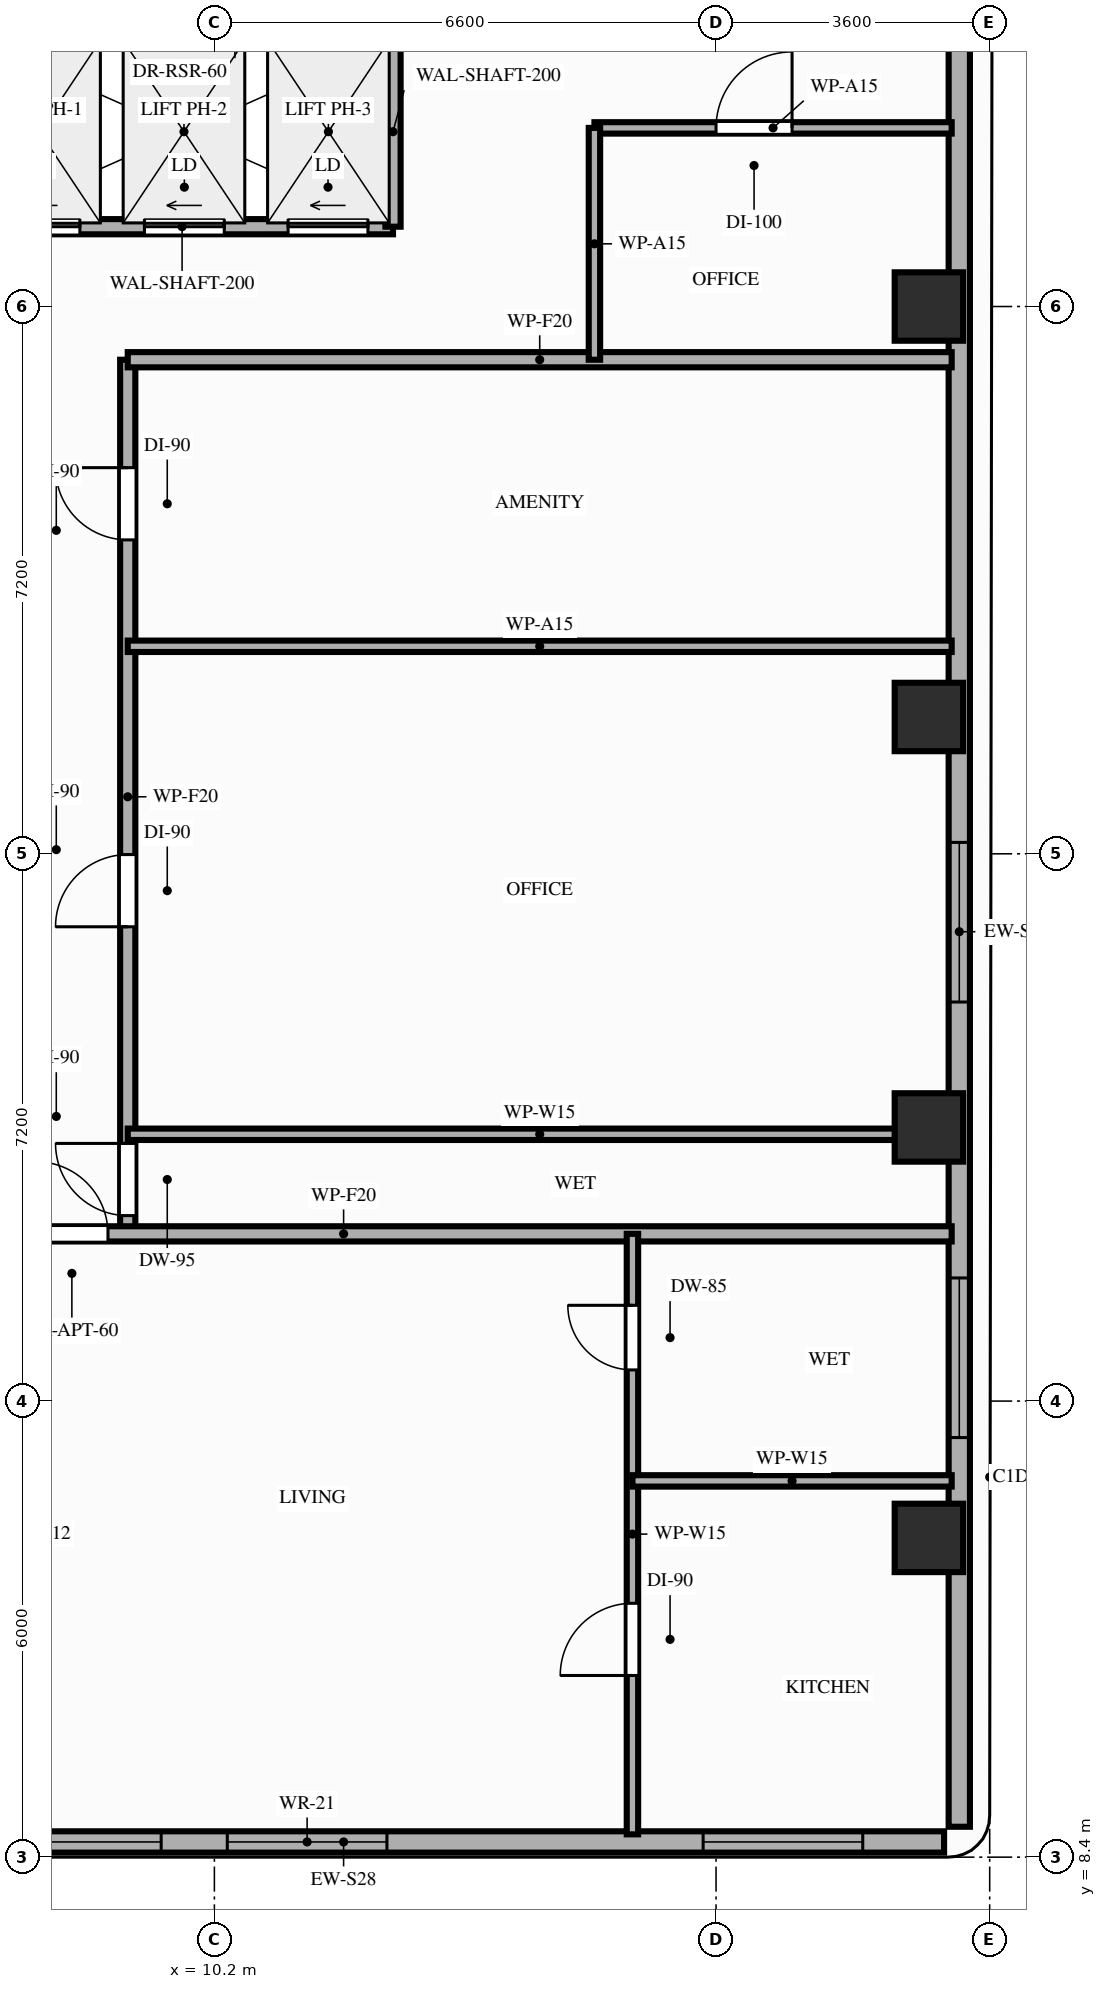
"""IFC4 building model, lengths in metres.
Left out: names, types, materials, properties, quantities, classifications, styles, units other than length and angle.
Written with IfcOpenShell. Run it as: python <this file> out.ifc"""

import sys

from ifc_helpers import new_model, si_unit, direction, frame, frame_2d, origin, origin_2d, place, context, subcontext, project, spatial, rectangle, extrude, element, fill, save


model = new_model("IFC4")
c1 = context("Model", 3, precision=1e-05, world=origin(), true_north=direction((0.0, 1.0)))
c2 = subcontext(c1, "Body", "Model", "MODEL_VIEW")
j1 = project(units=[si_unit("LENGTHUNIT", "METRE"), si_unit("PLANEANGLEUNIT", "RADIAN")], contexts=[c1])
p1 = place(None, origin())
s1 = spatial("IfcSite", under=j1, at=p1, CompositionType="ELEMENT")
p2 = place(p1, origin())
s2 = spatial("IfcBuilding", under=s1, at=p2, CompositionType="ELEMENT")
p3 = place(p2, frame((0.0, 0.0, 204.8)))
s3 = spatial("IfcBuildingStorey", under=s2, at=p3, CompositionType="ELEMENT", Elevation=204.8)
for number, where, z_axis, x_axis in (
    (1, (19.6, 12.6, 0.0), (0.0, 0.0, 1.0), (1.0, 0.0, 0.0)),
    (2, (19.6, 18.0, 0.0), (0.0, 0.0, 1.0), (1.0, 0.0, 0.0)),
    (3, (19.6, 23.4, 0.0), (0.0, 0.0, 1.0), (1.0, 0.0, 0.0)),
    (4, (19.6, 28.8, 0.0), (0.0, 0.0, 1.0), (1.0, 0.0, 0.0)),
):
    element("IfcColumn", number, at=place(p3, frame(where, z_axis=z_axis, x_axis=x_axis)), inside=s3, PredefinedType="COLUMN", context=c2, shape_type="SweptSolid", body=[
        extrude(rectangle(XDim=0.9, YDim=0.9, at=origin_2d()), origin(), (0.0, 0.0, 1.0), 3.2),
    ])
p4 = place(p3, frame((4.0, 8.6, 0.0), z_axis=(0.0, 0.0, 1.0), x_axis=(1.0, 0.0, 0.0)))
e5 = element("IfcWall", 5, at=p4, inside=s3, PredefinedType="STANDARD", context=c2, shape_type="SweptSolid", body=[
    extrude(rectangle(XDim=15.8, YDim=0.28, at=frame_2d((7.9, 0.0))), origin(), (0.0, 0.0, 1.0), 3.02),
])
p5 = place(p4, frame((6.37, 0.0, 0.85)))
e6 = element("IfcOpeningElement", 6, at=p5, cuts=e5, PredefinedType="OPENING", context=c2, shape_type="SweptSolid", body=[
    extrude(rectangle(XDim=2.1, YDim=1.8, at=frame_2d((1.05, 0.9))), frame((0.0, 0.15, 0.0), z_axis=(0.0, -1.0, 0.0), x_axis=(1.0, 0.0, 0.0)), (0.0, 0.0, 1.0), 0.3),
])
p6 = place(p4, frame((12.63, 0.0, 0.85)))
e7 = element("IfcOpeningElement", 7, at=p6, cuts=e5, PredefinedType="OPENING", context=c2, shape_type="SweptSolid", body=[
    extrude(rectangle(XDim=2.1, YDim=1.8, at=frame_2d((1.05, 0.9))), frame((0.0, 0.15, 0.0), z_axis=(0.0, -1.0, 0.0), x_axis=(1.0, 0.0, 0.0)), (0.0, 0.0, 1.0), 0.3),
])
p7 = place(p4, frame((3.4, 0.0, 0.85)))
e8 = element("IfcOpeningElement", 8, at=p7, cuts=e5, PredefinedType="OPENING", context=c2, shape_type="SweptSolid", body=[
    extrude(rectangle(XDim=2.1, YDim=1.8, at=frame_2d((1.05, 0.9))), frame((0.0, 0.15, 0.0), z_axis=(0.0, -1.0, 0.0), x_axis=(1.0, 0.0, 0.0)), (0.0, 0.0, 1.0), 0.3),
])
p8 = place(p3, frame((20.0, 8.8, 0.0), z_axis=(0.0, 0.0, 1.0), x_axis=(0.0, 1.0, 0.0)))
e9 = element("IfcWall", 9, at=p8, inside=s3, PredefinedType="STANDARD", context=c2, shape_type="SweptSolid", body=[
    extrude(rectangle(XDim=23.55, YDim=0.28, at=frame_2d((11.775, 0.0))), origin(), (0.0, 0.0, 1.0), 2.51),
])
p9 = place(p8, frame((5.12, 0.0, 0.85)))
e10 = element("IfcOpeningElement", 10, at=p9, cuts=e9, PredefinedType="OPENING", context=c2, shape_type="SweptSolid", body=[
    extrude(rectangle(XDim=2.1, YDim=1.41, at=frame_2d((1.05, 0.705))), frame((0.0, 0.15, 0.0), z_axis=(0.0, -1.0, 0.0), x_axis=(1.0, 0.0, 0.0)), (0.0, 0.0, 1.0), 0.3),
])
p10 = place(p8, frame((10.85, 0.0, 0.85)))
e11 = element("IfcOpeningElement", 11, at=p10, cuts=e9, PredefinedType="OPENING", context=c2, shape_type="SweptSolid", body=[
    extrude(rectangle(XDim=2.1, YDim=1.41, at=frame_2d((1.05, 0.705))), frame((0.0, 0.15, 0.0), z_axis=(0.0, -1.0, 0.0), x_axis=(1.0, 0.0, 0.0)), (0.0, 0.0, 1.0), 0.3),
])
p11 = place(p3, frame((7.0, 29.85, 0.0), z_axis=(0.0, 0.0, 1.0), x_axis=(1.0, 0.0, 0.0)))
e12 = element("IfcWall", 12, at=p11, inside=s3, PredefinedType="MOVABLE", context=c2, shape_type="SweptSolid", body=[
    extrude(rectangle(XDim=5.55, YDim=0.2, at=frame_2d((2.775, 0.0))), origin(), (0.0, 0.0, 1.0), 3.02),
])
p12 = place(p11, frame((0.38, 0.0, 0.0)))
e13 = element("IfcOpeningElement", 13, at=p12, cuts=e12, PredefinedType="OPENING", context=c2, shape_type="SweptSolid", body=[
    extrude(rectangle(XDim=1.05, YDim=2.15, at=frame_2d((0.525, 1.075))), frame((0.0, 0.11, 0.0), z_axis=(0.0, -1.0, 0.0), x_axis=(1.0, 0.0, 0.0)), (0.0, 0.0, 1.0), 0.22),
])
p13 = place(p11, frame((2.28, 0.0, 0.0)))
e14 = element("IfcOpeningElement", 14, at=p13, cuts=e12, PredefinedType="OPENING", context=c2, shape_type="SweptSolid", body=[
    extrude(rectangle(XDim=1.05, YDim=2.15, at=frame_2d((0.525, 1.075))), frame((0.0, 0.11, 0.0), z_axis=(0.0, -1.0, 0.0), x_axis=(1.0, 0.0, 0.0)), (0.0, 0.0, 1.0), 0.22),
])
p14 = place(p11, frame((4.17, 0.0, 0.0)))
e15 = element("IfcOpeningElement", 15, at=p14, cuts=e12, PredefinedType="OPENING", context=c2, shape_type="SweptSolid", body=[
    extrude(rectangle(XDim=1.05, YDim=2.15, at=frame_2d((0.525, 1.075))), frame((0.0, 0.11, 0.0), z_axis=(0.0, -1.0, 0.0), x_axis=(1.0, 0.0, 0.0)), (0.0, 0.0, 1.0), 0.22),
])
p15 = place(p3, frame((12.55, 29.85, 0.0), z_axis=(0.0, 0.0, 1.0), x_axis=(0.0, 1.0, 0.0)))
e16 = element("IfcWall", 16, at=p15, inside=s3, PredefinedType="MOVABLE", context=c2, shape_type="SweptSolid", body=[
    extrude(rectangle(XDim=2.5, YDim=0.2, at=frame_2d((1.25, 0.0))), origin(), (0.0, 0.0, 1.0), 3.02),
])
p16 = place(p3, frame((9.06, 16.6, 0.0), z_axis=(0.0, 0.0, 1.0), x_axis=(0.0, 1.0, 0.0)))
e17 = element("IfcWall", 17, at=p16, inside=s3, PredefinedType="PARTITIONING", context=c2, shape_type="SweptSolid", body=[
    extrude(rectangle(XDim=11.5, YDim=0.2, at=frame_2d((5.75, 0.0))), origin(), (0.0, 0.0, 1.0), 2.51),
])
p17 = place(p16, frame((0.24, 0.0, 0.0)))
e18 = element("IfcOpeningElement", 18, at=p17, cuts=e17, PredefinedType="OPENING", context=c2, shape_type="SweptSolid", body=[
    extrude(rectangle(XDim=0.95, YDim=2.1, at=frame_2d((0.475, 1.05))), frame((0.0, 0.11, 0.0), z_axis=(0.0, -1.0, 0.0), x_axis=(1.0, 0.0, 0.0)), (0.0, 0.0, 1.0), 0.22),
])
p18 = place(p16, frame((4.04, 0.0, 0.0)))
e19 = element("IfcOpeningElement", 19, at=p18, cuts=e17, PredefinedType="OPENING", context=c2, shape_type="SweptSolid", body=[
    extrude(rectangle(XDim=0.95, YDim=2.15, at=frame_2d((0.475, 1.075))), frame((0.0, 0.11, 0.0), z_axis=(0.0, -1.0, 0.0), x_axis=(1.0, 0.0, 0.0)), (0.0, 0.0, 1.0), 0.22),
])
p19 = place(p16, frame((9.13, 0.0, 0.0)))
e20 = element("IfcOpeningElement", 20, at=p19, cuts=e17, PredefinedType="OPENING", context=c2, shape_type="SweptSolid", body=[
    extrude(rectangle(XDim=0.95, YDim=2.15, at=frame_2d((0.475, 1.075))), frame((0.0, 0.11, 0.0), z_axis=(0.0, -1.0, 0.0), x_axis=(1.0, 0.0, 0.0)), (0.0, 0.0, 1.0), 0.22),
])
p20 = place(p3, frame((3.9, 16.6, 0.0), z_axis=(0.0, 0.0, 1.0), x_axis=(1.0, 0.0, 0.0)))
e21 = element("IfcWall", 21, at=p20, inside=s3, PredefinedType="PARTITIONING", context=c2, shape_type="SweptSolid", body=[
    extrude(rectangle(XDim=16.0, YDim=0.2, at=frame_2d((8.0, 0.0))), origin(), (0.0, 0.0, 1.0), 2.51),
])
p21 = place(p20, frame((3.95, 0.0, 0.0)))
e22 = element("IfcOpeningElement", 22, at=p21, cuts=e21, PredefinedType="OPENING", context=c2, shape_type="SweptSolid", body=[
    extrude(rectangle(XDim=0.95, YDim=2.15, at=frame_2d((0.475, 1.075))), frame((0.0, 0.11, 0.0), z_axis=(0.0, -1.0, 0.0), x_axis=(1.0, 0.0, 0.0)), (0.0, 0.0, 1.0), 0.22),
])
p22 = place(p3, frame((9.06, 28.1, 0.0), z_axis=(0.0, 0.0, 1.0), x_axis=(1.0, 0.0, 0.0)))
e23 = element("IfcWall", 23, at=p22, inside=s3, PredefinedType="PARTITIONING", context=c2, shape_type="SweptSolid", body=[
    extrude(rectangle(XDim=10.84, YDim=0.2, at=frame_2d((5.42, 0.0))), origin(), (0.0, 0.0, 1.0), 2.51),
])
p23 = place(p3, frame((15.2, 31.15, 0.0), z_axis=(0.0, 0.0, 1.0), x_axis=(1.0, 0.0, 0.0)))
e24 = element("IfcWall", 24, at=p23, inside=s3, PredefinedType="PARTITIONING", context=c2, shape_type="SweptSolid", body=[
    extrude(rectangle(XDim=4.7, YDim=0.15, at=frame_2d((2.35, 0.0))), origin(), (0.0, 0.0, 1.0), 2.51),
])
p24 = place(p23, frame((1.6, 0.0, 0.0)))
e25 = element("IfcOpeningElement", 25, at=p24, cuts=e24, PredefinedType="OPENING", context=c2, shape_type="SweptSolid", body=[
    extrude(rectangle(XDim=1.0, YDim=2.15, at=frame_2d((0.5, 1.075))), frame((0.0, 0.085, 0.0), z_axis=(0.0, -1.0, 0.0), x_axis=(1.0, 0.0, 0.0)), (0.0, 0.0, 1.0), 0.17),
])
p25 = place(p3, frame((15.2, 28.1, 0.0), z_axis=(0.0, 0.0, 1.0), x_axis=(0.0, 1.0, 0.0)))
e26 = element("IfcWall", 26, at=p25, inside=s3, PredefinedType="PARTITIONING", context=c2, shape_type="SweptSolid", body=[
    extrude(rectangle(XDim=3.05, YDim=0.15, at=frame_2d((1.525, 0.0))), origin(), (0.0, 0.0, 1.0), 2.51),
])
p26 = place(p3, frame((15.7, 8.7, 0.0), z_axis=(0.0, 0.0, 1.0), x_axis=(0.0, 1.0, 0.0)))
e27 = element("IfcWall", 27, at=p26, inside=s3, PredefinedType="PARTITIONING", context=c2, shape_type="SweptSolid", body=[
    extrude(rectangle(XDim=7.9, YDim=0.15, at=frame_2d((3.95, 0.0))), origin(), (0.0, 0.0, 1.0), 2.51),
])
p27 = place(p26, frame((2.09, 0.0, 0.0)))
e28 = element("IfcOpeningElement", 28, at=p27, cuts=e27, PredefinedType="OPENING", context=c2, shape_type="SweptSolid", body=[
    extrude(rectangle(XDim=0.95, YDim=2.15, at=frame_2d((0.475, 1.075))), frame((0.0, 0.085, 0.0), z_axis=(0.0, -1.0, 0.0), x_axis=(1.0, 0.0, 0.0)), (0.0, 0.0, 1.0), 0.17),
])
p28 = place(p26, frame((6.11, 0.0, 0.0)))
e29 = element("IfcOpeningElement", 29, at=p28, cuts=e27, PredefinedType="OPENING", context=c2, shape_type="SweptSolid", body=[
    extrude(rectangle(XDim=0.85, YDim=2.1, at=frame_2d((0.425, 1.05))), frame((0.0, 0.085, 0.0), z_axis=(0.0, -1.0, 0.0), x_axis=(1.0, 0.0, 0.0)), (0.0, 0.0, 1.0), 0.17),
])
p29 = place(p3, frame((15.7, 13.35, 0.0), z_axis=(0.0, 0.0, 1.0), x_axis=(1.0, 0.0, 0.0)))
e30 = element("IfcWall", 30, at=p29, inside=s3, PredefinedType="PARTITIONING", context=c2, shape_type="SweptSolid", body=[
    extrude(rectangle(XDim=4.2, YDim=0.15, at=frame_2d((2.1, 0.0))), origin(), (0.0, 0.0, 1.0), 2.51),
])
for number, where, z_axis, x_axis in (
    (31, (9.06, 17.91, 0.0), (0.0, 0.0, 1.0), (1.0, 0.0, 0.0)),
    (32, (9.06, 24.33, 0.0), (0.0, 0.0, 1.0), (1.0, 0.0, 0.0)),
):
    element("IfcWall", number, at=place(p3, frame(where, z_axis=z_axis, x_axis=x_axis)), inside=s3, PredefinedType="PARTITIONING", context=c2, shape_type="SweptSolid", body=[
        extrude(rectangle(XDim=10.84, YDim=0.15, at=frame_2d((5.42, 0.0))), origin(), (0.0, 0.0, 1.0), 2.51),
    ])
p30 = place(p5, origin())
e33 = element("IfcWindow", 33, at=p30, inside=s3, PartitioningType="SINGLE_PANEL", PredefinedType="WINDOW", context=c2, shape_type="SweptSolid", body=[
    extrude(rectangle(XDim=2.1, YDim=1.8, at=frame_2d((1.05, 0.9))), frame((0.0, 0.03, 0.0), z_axis=(0.0, -1.0, 0.0), x_axis=(1.0, 0.0, 0.0)), (0.0, 0.0, 1.0), 0.06),
])
fill(e6, e33)
p31 = place(p6, origin())
e34 = element("IfcWindow", 34, at=p31, inside=s3, PartitioningType="SINGLE_PANEL", PredefinedType="WINDOW", context=c2, shape_type="SweptSolid", body=[
    extrude(rectangle(XDim=2.1, YDim=1.8, at=frame_2d((1.05, 0.9))), frame((0.0, 0.03, 0.0), z_axis=(0.0, -1.0, 0.0), x_axis=(1.0, 0.0, 0.0)), (0.0, 0.0, 1.0), 0.06),
])
fill(e7, e34)
p32 = place(p9, origin())
e35 = element("IfcWindow", 35, at=p32, inside=s3, PartitioningType="SINGLE_PANEL", PredefinedType="WINDOW", context=c2, shape_type="SweptSolid", body=[
    extrude(rectangle(XDim=2.1, YDim=1.41, at=frame_2d((1.05, 0.705))), frame((0.0, 0.03, 0.0), z_axis=(0.0, -1.0, 0.0), x_axis=(1.0, 0.0, 0.0)), (0.0, 0.0, 1.0), 0.06),
])
fill(e10, e35)
p33 = place(p10, origin())
e36 = element("IfcWindow", 36, at=p33, inside=s3, PartitioningType="SINGLE_PANEL", PredefinedType="WINDOW", context=c2, shape_type="SweptSolid", body=[
    extrude(rectangle(XDim=2.1, YDim=1.41, at=frame_2d((1.05, 0.705))), frame((0.0, 0.03, 0.0), z_axis=(0.0, -1.0, 0.0), x_axis=(1.0, 0.0, 0.0)), (0.0, 0.0, 1.0), 0.06),
])
fill(e11, e36)
p34 = place(p7, origin())
e37 = element("IfcWindow", 37, at=p34, inside=s3, PartitioningType="SINGLE_PANEL", PredefinedType="WINDOW", context=c2, shape_type="SweptSolid", body=[
    extrude(rectangle(XDim=2.1, YDim=1.8, at=frame_2d((1.05, 0.9))), frame((0.0, 0.03, 0.0), z_axis=(0.0, -1.0, 0.0), x_axis=(1.0, 0.0, 0.0)), (0.0, 0.0, 1.0), 0.06),
])
fill(e8, e37)
p35 = place(p12, origin())
e38 = element("IfcDoor", 38, at=p35, inside=s3, OperationType="SLIDING_TO_LEFT", PredefinedType="DOOR", context=c2, shape_type="SweptSolid", body=[
    extrude(rectangle(XDim=1.05, YDim=2.15, at=frame_2d((0.525, 1.075))), frame((0.0, 0.025, 0.0), z_axis=(0.0, -1.0, 0.0), x_axis=(1.0, 0.0, 0.0)), (0.0, 0.0, 1.0), 0.05),
])
fill(e13, e38)
p36 = place(p13, origin())
e39 = element("IfcDoor", 39, at=p36, inside=s3, OperationType="SLIDING_TO_LEFT", PredefinedType="DOOR", context=c2, shape_type="SweptSolid", body=[
    extrude(rectangle(XDim=1.05, YDim=2.15, at=frame_2d((0.525, 1.075))), frame((0.0, 0.025, 0.0), z_axis=(0.0, -1.0, 0.0), x_axis=(1.0, 0.0, 0.0)), (0.0, 0.0, 1.0), 0.05),
])
fill(e14, e39)
p37 = place(p14, origin())
e40 = element("IfcDoor", 40, at=p37, inside=s3, OperationType="SLIDING_TO_LEFT", PredefinedType="DOOR", context=c2, shape_type="SweptSolid", body=[
    extrude(rectangle(XDim=1.05, YDim=2.15, at=frame_2d((0.525, 1.075))), frame((0.0, 0.025, 0.0), z_axis=(0.0, -1.0, 0.0), x_axis=(1.0, 0.0, 0.0)), (0.0, 0.0, 1.0), 0.05),
])
fill(e15, e40)
p38 = place(p24, origin())
e41 = element("IfcDoor", 41, at=p38, inside=s3, OperationType="SINGLE_SWING_RIGHT", PredefinedType="DOOR", context=c2, shape_type="SweptSolid", body=[
    extrude(rectangle(XDim=1.0, YDim=2.15, at=frame_2d((0.5, 1.075))), frame((0.0, 0.025, 0.0), z_axis=(0.0, -1.0, 0.0), x_axis=(1.0, 0.0, 0.0)), (0.0, 0.0, 1.0), 0.05),
])
fill(e25, e41)
p39 = place(p21, origin())
e42 = element("IfcDoor", 42, at=p39, inside=s3, OperationType="SINGLE_SWING_LEFT", PredefinedType="DOOR", context=c2, shape_type="SweptSolid", body=[
    extrude(rectangle(XDim=0.95, YDim=2.15, at=frame_2d((0.475, 1.075))), frame((0.0, 0.025, 0.0), z_axis=(0.0, -1.0, 0.0), x_axis=(1.0, 0.0, 0.0)), (0.0, 0.0, 1.0), 0.05),
])
fill(e22, e42)
p40 = place(p27, origin())
e43 = element("IfcDoor", 43, at=p40, inside=s3, OperationType="SINGLE_SWING_LEFT", PredefinedType="DOOR", context=c2, shape_type="SweptSolid", body=[
    extrude(rectangle(XDim=0.95, YDim=2.15, at=frame_2d((0.475, 1.075))), frame((0.0, 0.025, 0.0), z_axis=(0.0, -1.0, 0.0), x_axis=(1.0, 0.0, 0.0)), (0.0, 0.0, 1.0), 0.05),
])
fill(e28, e43)
p41 = place(p28, origin())
e44 = element("IfcDoor", 44, at=p41, inside=s3, OperationType="SINGLE_SWING_RIGHT", PredefinedType="DOOR", context=c2, shape_type="SweptSolid", body=[
    extrude(rectangle(XDim=0.85, YDim=2.1, at=frame_2d((0.425, 1.05))), frame((0.0, 0.025, 0.0), z_axis=(0.0, -1.0, 0.0), x_axis=(1.0, 0.0, 0.0)), (0.0, 0.0, 1.0), 0.05),
])
fill(e29, e44)
p42 = place(p17, origin())
e45 = element("IfcDoor", 45, at=p42, inside=s3, OperationType="SINGLE_SWING_RIGHT", PredefinedType="DOOR", context=c2, shape_type="SweptSolid", body=[
    extrude(rectangle(XDim=0.95, YDim=2.1, at=frame_2d((0.475, 1.05))), frame((0.0, 0.025, 0.0), z_axis=(0.0, -1.0, 0.0), x_axis=(1.0, 0.0, 0.0)), (0.0, 0.0, 1.0), 0.05),
])
fill(e18, e45)
p43 = place(p18, origin())
e46 = element("IfcDoor", 46, at=p43, inside=s3, OperationType="SINGLE_SWING_LEFT", PredefinedType="DOOR", context=c2, shape_type="SweptSolid", body=[
    extrude(rectangle(XDim=0.95, YDim=2.15, at=frame_2d((0.475, 1.075))), frame((0.0, 0.025, 0.0), z_axis=(0.0, -1.0, 0.0), x_axis=(1.0, 0.0, 0.0)), (0.0, 0.0, 1.0), 0.05),
])
fill(e19, e46)
p44 = place(p19, origin())
e47 = element("IfcDoor", 47, at=p44, inside=s3, OperationType="SINGLE_SWING_RIGHT", PredefinedType="DOOR", context=c2, shape_type="SweptSolid", body=[
    extrude(rectangle(XDim=0.95, YDim=2.15, at=frame_2d((0.475, 1.075))), frame((0.0, 0.025, 0.0), z_axis=(0.0, -1.0, 0.0), x_axis=(1.0, 0.0, 0.0)), (0.0, 0.0, 1.0), 0.05),
])
fill(e20, e47)
save(model, sys.argv[1])
